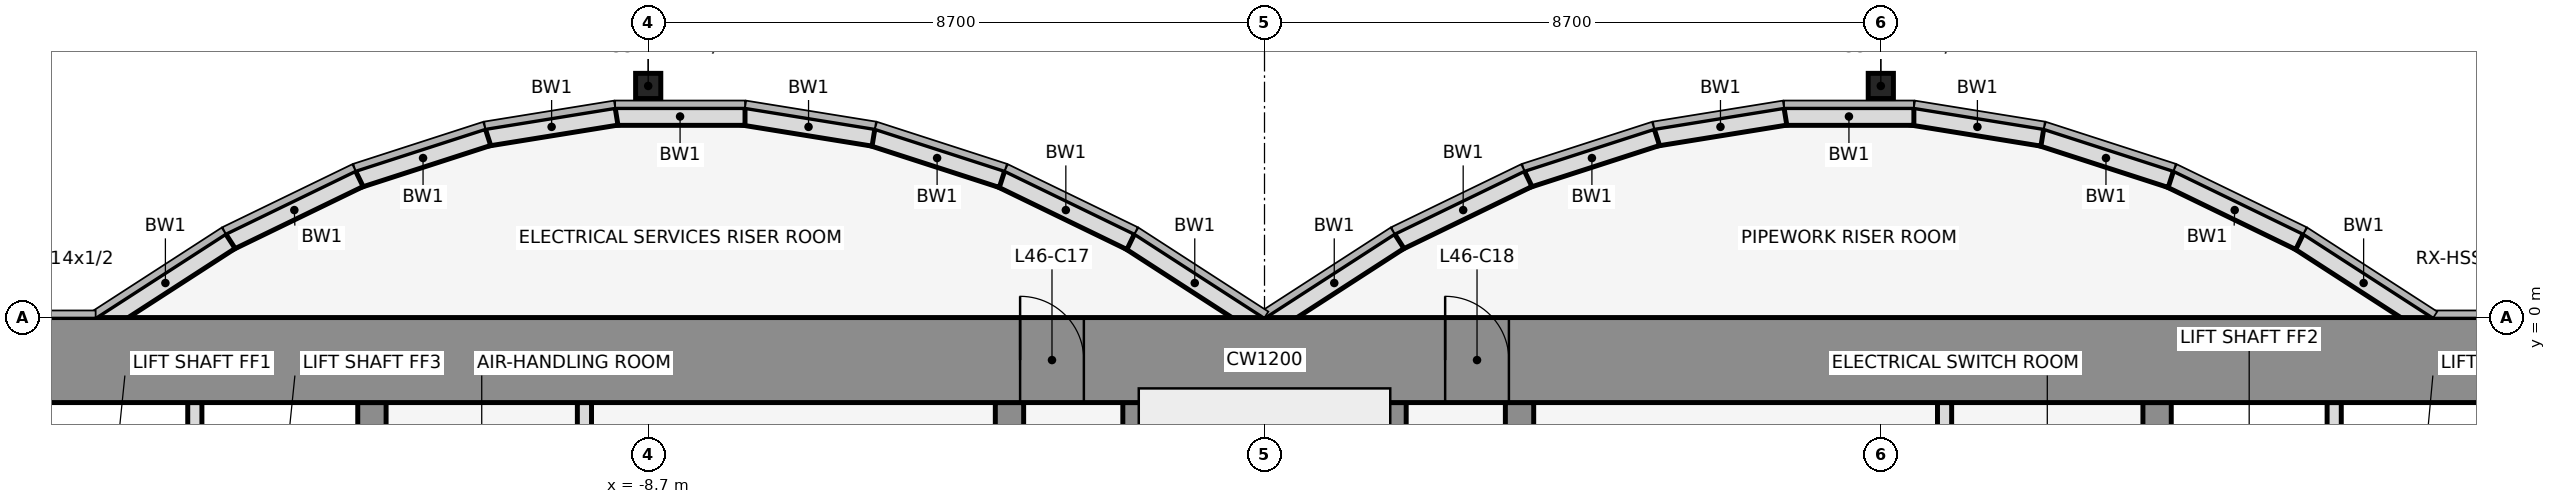
"""IFC4 building model, lengths in metres.
Left out: names, types, materials, properties, quantities, classifications, styles, units other than length and angle.
Written with IfcOpenShell. Run it as: python <this file> out.ifc"""

import sys

from ifc_helpers import new_model, si_unit, direction, frame, frame_2d, origin, origin_2d, place, context, subcontext, project, spatial, rectangle, hollow_rectangle, extrude, element, fill, save


model = new_model("IFC4")
c1 = context("Model", 3, precision=1e-05, world=origin(), true_north=direction((0.0, 1.0)))
c2 = subcontext(c1, "Body", "Model", "MODEL_VIEW")
j1 = project(units=[si_unit("LENGTHUNIT", "METRE"), si_unit("PLANEANGLEUNIT", "RADIAN")], contexts=[c1])
p1 = place(None, origin())
s1 = spatial("IfcSite", under=j1, at=p1, CompositionType="ELEMENT")
p2 = place(p1, origin())
s2 = spatial("IfcBuilding", under=s1, at=p2, CompositionType="ELEMENT")
p3 = place(p2, frame((0.0, 0.0, 207.3)))
s3 = spatial("IfcBuildingStorey", under=s2, at=p3, CompositionType="ELEMENT", Elevation=207.3)
for number, where, z_axis, x_axis in (
    (1, (-8.7, 3.269, 0.0), (0.0, 0.0, 1.0), (1.0, 0.0, 0.0)),
    (2, (8.7, 3.269, 0.0), (0.0, 0.0, 1.0), (1.0, 0.0, 0.0)),
):
    element("IfcColumn", number, at=place(p3, frame(where, z_axis=z_axis, x_axis=x_axis)), inside=s3, PredefinedType="COLUMN", context=c2, shape_type="SweptSolid", body=[
        extrude(hollow_rectangle(XDim=0.356, YDim=0.356, WallThickness=0.012, at=origin_2d()), origin(), (0.0, 0.0, 1.0), 4.1),
    ])
p4 = place(p3, frame((16.432, -0.105, 0.0), z_axis=(0.0, 0.0, 1.0), x_axis=(-0.83981312244, 0.542875602121, 0.0)))
e3 = element("IfcWall", 3, at=p4, inside=s3, PredefinedType="STANDARD", context=c2, shape_type="SweptSolid", body=[
    extrude(rectangle(XDim=2.183, YDim=0.25, at=frame_2d((1.091, 0.0))), origin(), (0.0, 0.0, 1.0), 3.95),
])
p5 = place(p3, frame((14.612, 1.073, 0.0), z_axis=(0.0, 0.0, 1.0), x_axis=(-0.89982408427, 0.436252928206, 0.0)))
e4 = element("IfcWall", 4, at=p5, inside=s3, PredefinedType="STANDARD", context=c2, shape_type="SweptSolid", body=[
    extrude(rectangle(XDim=2.038, YDim=0.25, at=frame_2d((1.019, 0.0))), origin(), (0.0, 0.0, 1.0), 3.95),
])
p6 = place(p3, frame((12.795, 1.955, 0.0), z_axis=(0.0, 0.0, 1.0), x_axis=(-0.951495806175, 0.307661714928, 0.0)))
e5 = element("IfcWall", 5, at=p6, inside=s3, PredefinedType="STANDARD", context=c2, shape_type="SweptSolid", body=[
    extrude(rectangle(XDim=1.927, YDim=0.25, at=frame_2d((0.963, 0.0))), origin(), (0.0, 0.0, 1.0), 3.95),
])
p7 = place(p3, frame((10.98, 2.543, 0.0), z_axis=(0.0, 0.0, 1.0), x_axis=(-0.987181718931, 0.159600293885, 0.0)))
e6 = element("IfcWall", 6, at=p7, inside=s3, PredefinedType="STANDARD", context=c2, shape_type="SweptSolid", body=[
    extrude(rectangle(XDim=1.857, YDim=0.25, at=frame_2d((0.929, 0.0))), origin(), (0.0, 0.0, 1.0), 3.95),
])
p8 = place(p3, frame((9.167, 2.838, 0.0), z_axis=(0.0, 0.0, 1.0), x_axis=(-1.0, 0.0, 0.0)))
e7 = element("IfcWall", 7, at=p8, inside=s3, PredefinedType="STANDARD", context=c2, shape_type="SweptSolid", body=[
    extrude(rectangle(XDim=1.833, YDim=0.25, at=frame_2d((0.917, 0.0))), origin(), (0.0, 0.0, 1.0), 3.95),
])
p9 = place(p3, frame((7.353, 2.84, 0.0), z_axis=(0.0, 0.0, 1.0), x_axis=(-0.987181718931, -0.159600293885, 0.0)))
e8 = element("IfcWall", 8, at=p9, inside=s3, PredefinedType="STANDARD", context=c2, shape_type="SweptSolid", body=[
    extrude(rectangle(XDim=1.857, YDim=0.25, at=frame_2d((0.929, 0.0))), origin(), (0.0, 0.0, 1.0), 3.95),
])
p10 = place(p3, frame((5.538, 2.548, 0.0), z_axis=(0.0, 0.0, 1.0), x_axis=(-0.951495806175, -0.307661714928, 0.0)))
e9 = element("IfcWall", 9, at=p10, inside=s3, PredefinedType="STANDARD", context=c2, shape_type="SweptSolid", body=[
    extrude(rectangle(XDim=1.927, YDim=0.25, at=frame_2d((0.963, 0.0))), origin(), (0.0, 0.0, 1.0), 3.95),
])
p11 = place(p3, frame((3.721, 1.962, 0.0), z_axis=(0.0, 0.0, 1.0), x_axis=(-0.89982408427, -0.436252928206, 0.0)))
e10 = element("IfcWall", 10, at=p11, inside=s3, PredefinedType="STANDARD", context=c2, shape_type="SweptSolid", body=[
    extrude(rectangle(XDim=2.038, YDim=0.25, at=frame_2d((1.019, 0.0))), origin(), (0.0, 0.0, 1.0), 3.95),
])
for number, where, z_axis, x_axis in (
    (11, (1.901, 1.08, 0.0), (0.0, 0.0, 1.0), (-0.84, -0.543, 0.0)),
    (12, (-0.068, -0.105, 0.0), (0.0, 0.0, 1.0), (-0.84, 0.543, 0.0)),
):
    element("IfcWall", number, at=place(p3, frame(where, z_axis=z_axis, x_axis=x_axis)), inside=s3, PredefinedType="STANDARD", context=c2, shape_type="SweptSolid", body=[
        extrude(rectangle(XDim=2.183, YDim=0.25, at=frame_2d((1.091, 0.0))), origin(), (0.0, 0.0, 1.0), 3.95),
    ])
p12 = place(p3, frame((-1.888, 1.073, 0.0), z_axis=(0.0, 0.0, 1.0), x_axis=(-0.89982408427, 0.436252928206, 0.0)))
e13 = element("IfcWall", 13, at=p12, inside=s3, PredefinedType="STANDARD", context=c2, shape_type="SweptSolid", body=[
    extrude(rectangle(XDim=2.038, YDim=0.25, at=frame_2d((1.019, 0.0))), origin(), (0.0, 0.0, 1.0), 3.95),
])
p13 = place(p3, frame((-3.705, 1.955, 0.0), z_axis=(0.0, 0.0, 1.0), x_axis=(-0.951495806175, 0.307661714928, 0.0)))
e14 = element("IfcWall", 14, at=p13, inside=s3, PredefinedType="STANDARD", context=c2, shape_type="SweptSolid", body=[
    extrude(rectangle(XDim=1.927, YDim=0.25, at=frame_2d((0.963, 0.0))), origin(), (0.0, 0.0, 1.0), 3.95),
])
p14 = place(p3, frame((-5.52, 2.543, 0.0), z_axis=(0.0, 0.0, 1.0), x_axis=(-0.987181718931, 0.159600293885, 0.0)))
e15 = element("IfcWall", 15, at=p14, inside=s3, PredefinedType="STANDARD", context=c2, shape_type="SweptSolid", body=[
    extrude(rectangle(XDim=1.857, YDim=0.25, at=frame_2d((0.929, 0.0))), origin(), (0.0, 0.0, 1.0), 3.95),
])
p15 = place(p3, frame((-7.333, 2.838, 0.0), z_axis=(0.0, 0.0, 1.0), x_axis=(-1.0, 0.0, 0.0)))
e16 = element("IfcWall", 16, at=p15, inside=s3, PredefinedType="STANDARD", context=c2, shape_type="SweptSolid", body=[
    extrude(rectangle(XDim=1.833, YDim=0.25, at=frame_2d((0.917, 0.0))), origin(), (0.0, 0.0, 1.0), 3.95),
])
p16 = place(p3, frame((-9.147, 2.84, 0.0), z_axis=(0.0, 0.0, 1.0), x_axis=(-0.987181718931, -0.159600293885, 0.0)))
e17 = element("IfcWall", 17, at=p16, inside=s3, PredefinedType="STANDARD", context=c2, shape_type="SweptSolid", body=[
    extrude(rectangle(XDim=1.857, YDim=0.25, at=frame_2d((0.929, 0.0))), origin(), (0.0, 0.0, 1.0), 3.95),
])
p17 = place(p3, frame((-10.962, 2.548, 0.0), z_axis=(0.0, 0.0, 1.0), x_axis=(-0.951495806175, -0.307661714928, 0.0)))
e18 = element("IfcWall", 18, at=p17, inside=s3, PredefinedType="STANDARD", context=c2, shape_type="SweptSolid", body=[
    extrude(rectangle(XDim=1.927, YDim=0.25, at=frame_2d((0.963, 0.0))), origin(), (0.0, 0.0, 1.0), 3.95),
])
p18 = place(p3, frame((-12.779, 1.962, 0.0), z_axis=(0.0, 0.0, 1.0), x_axis=(-0.89982408427, -0.436252928206, 0.0)))
e19 = element("IfcWall", 19, at=p18, inside=s3, PredefinedType="STANDARD", context=c2, shape_type="SweptSolid", body=[
    extrude(rectangle(XDim=2.038, YDim=0.25, at=frame_2d((1.019, 0.0))), origin(), (0.0, 0.0, 1.0), 3.95),
])
p19 = place(p3, frame((-14.599, 1.08, 0.0), z_axis=(0.0, 0.0, 1.0), x_axis=(-0.83981312244, -0.542875602121, 0.0)))
e20 = element("IfcWall", 20, at=p19, inside=s3, PredefinedType="STANDARD", context=c2, shape_type="SweptSolid", body=[
    extrude(rectangle(XDim=2.183, YDim=0.25, at=frame_2d((1.091, 0.0))), origin(), (0.0, 0.0, 1.0), 3.95),
])
p20 = place(p3, frame((-15.1, -4.6, 0.0), z_axis=(0.0, 0.0, 1.0), x_axis=(0.0, 1.0, 0.0)))
e21 = element("IfcWall", 21, at=p20, inside=s3, PredefinedType="PARTITIONING", context=c2, shape_type="SweptSolid", body=[
    extrude(rectangle(XDim=3.4, YDim=0.2, at=frame_2d((1.7, 0.0))), origin(), (0.0, 0.0, 1.0), 2.84),
])
p21 = place(p3, frame((-12.6, -11.8, 0.0), z_axis=(0.0, 0.0, 1.0), x_axis=(0.0, 1.0, 0.0)))
e22 = element("IfcWall", 22, at=p21, inside=s3, PredefinedType="SHEAR", context=c2, shape_type="SweptSolid", body=[
    extrude(rectangle(XDim=10.6, YDim=0.4, at=frame_2d((5.3, 0.0))), origin(), (0.0, 0.0, 1.0), 4.1),
])
p22 = place(p21, frame((4.75, 0.0, 0.0)))
e23 = element("IfcOpeningElement", 23, at=p22, cuts=e22, PredefinedType="OPENING", context=c2, shape_type="SweptSolid", body=[
    extrude(rectangle(XDim=1.1, YDim=2.1, at=frame_2d((0.55, 1.05))), frame((0.0, 0.212, 0.0), z_axis=(0.0, -1.0, 0.0), x_axis=(1.0, 0.0, 0.0)), (0.0, 0.0, 1.0), 0.424),
])
p23 = place(p3, frame((-9.6, -4.6, 0.0), z_axis=(0.0, 0.0, 1.0), x_axis=(0.0, 1.0, 0.0)))
e24 = element("IfcWall", 24, at=p23, inside=s3, PredefinedType="PARTITIONING", context=c2, shape_type="SweptSolid", body=[
    extrude(rectangle(XDim=3.4, YDim=0.2, at=frame_2d((1.7, 0.0))), origin(), (0.0, 0.0, 1.0), 2.84),
])
p24 = place(p3, frame((-3.6, -11.8, 0.0), z_axis=(0.0, 0.0, 1.0), x_axis=(0.0, 1.0, 0.0)))
e25 = element("IfcWall", 25, at=p24, inside=s3, PredefinedType="SHEAR", context=c2, shape_type="SweptSolid", body=[
    extrude(rectangle(XDim=10.6, YDim=0.4, at=frame_2d((5.3, 0.0))), origin(), (0.0, 0.0, 1.0), 4.1),
])
p25 = place(p24, frame((4.85, 0.0, 0.0)))
e26 = element("IfcOpeningElement", 26, at=p25, cuts=e25, PredefinedType="OPENING", context=c2, shape_type="SweptSolid", body=[
    extrude(rectangle(XDim=0.9, YDim=2.1, at=frame_2d((0.45, 1.05))), frame((0.0, 0.212, 0.0), z_axis=(0.0, -1.0, 0.0), x_axis=(1.0, 0.0, 0.0)), (0.0, 0.0, 1.0), 0.424),
])
for number, where, z_axis, x_axis in (
    (27, (-1.8, -11.8, 0.0), (0.0, 0.0, 1.0), (0.0, 1.0, 0.0)),
    (28, (1.8, -11.8, 0.0), (0.0, 0.0, 1.0), (0.0, 1.0, 0.0)),
):
    element("IfcWall", number, at=place(p3, frame(where, z_axis=z_axis, x_axis=x_axis)), inside=s3, PredefinedType="SHEAR", context=c2, shape_type="SweptSolid", body=[
        extrude(rectangle(XDim=10.6, YDim=0.4, at=frame_2d((5.3, 0.0))), origin(), (0.0, 0.0, 1.0), 4.1),
    ])
p26 = place(p3, frame((3.6, -11.8, 0.0), z_axis=(0.0, 0.0, 1.0), x_axis=(0.0, 1.0, 0.0)))
e29 = element("IfcWall", 29, at=p26, inside=s3, PredefinedType="SHEAR", context=c2, shape_type="SweptSolid", body=[
    extrude(rectangle(XDim=10.6, YDim=0.4, at=frame_2d((5.3, 0.0))), origin(), (0.0, 0.0, 1.0), 4.1),
])
p27 = place(p26, frame((1.35, 0.0, 0.0)))
e30 = element("IfcOpeningElement", 30, at=p27, cuts=e29, PredefinedType="OPENING", context=c2, shape_type="SweptSolid", body=[
    extrude(rectangle(XDim=0.9, YDim=2.1, at=frame_2d((0.45, 1.05))), frame((0.0, 0.212, 0.0), z_axis=(0.0, -1.0, 0.0), x_axis=(1.0, 0.0, 0.0)), (0.0, 0.0, 1.0), 0.424),
])
p28 = place(p3, frame((9.6, -4.6, 0.0), z_axis=(0.0, 0.0, 1.0), x_axis=(0.0, 1.0, 0.0)))
e31 = element("IfcWall", 31, at=p28, inside=s3, PredefinedType="PARTITIONING", context=c2, shape_type="SweptSolid", body=[
    extrude(rectangle(XDim=3.4, YDim=0.2, at=frame_2d((1.7, 0.0))), origin(), (0.0, 0.0, 1.0), 2.84),
])
p29 = place(p3, frame((12.6, -11.8, 0.0), z_axis=(0.0, 0.0, 1.0), x_axis=(0.0, 1.0, 0.0)))
e32 = element("IfcWall", 32, at=p29, inside=s3, PredefinedType="SHEAR", context=c2, shape_type="SweptSolid", body=[
    extrude(rectangle(XDim=10.6, YDim=0.4, at=frame_2d((5.3, 0.0))), origin(), (0.0, 0.0, 1.0), 4.1),
])
p30 = place(p29, frame((1.25, 0.0, 0.0)))
e33 = element("IfcOpeningElement", 33, at=p30, cuts=e32, PredefinedType="OPENING", context=c2, shape_type="SweptSolid", body=[
    extrude(rectangle(XDim=1.2, YDim=2.1, at=frame_2d((0.6, 1.05))), frame((0.0, 0.212, 0.0), z_axis=(0.0, -1.0, 0.0), x_axis=(1.0, 0.0, 0.0)), (0.0, 0.0, 1.0), 0.424),
])
p31 = place(p29, frame((4.75, 0.0, 0.0)))
e34 = element("IfcOpeningElement", 34, at=p31, cuts=e32, PredefinedType="OPENING", context=c2, shape_type="SweptSolid", body=[
    extrude(rectangle(XDim=1.1, YDim=2.1, at=frame_2d((0.55, 1.05))), frame((0.0, 0.212, 0.0), z_axis=(0.0, -1.0, 0.0), x_axis=(1.0, 0.0, 0.0)), (0.0, 0.0, 1.0), 0.424),
])
p32 = place(p3, frame((15.1, -4.6, 0.0), z_axis=(0.0, 0.0, 1.0), x_axis=(0.0, 1.0, 0.0)))
e35 = element("IfcWall", 35, at=p32, inside=s3, PredefinedType="PARTITIONING", context=c2, shape_type="SweptSolid", body=[
    extrude(rectangle(XDim=3.4, YDim=0.2, at=frame_2d((1.7, 0.0))), origin(), (0.0, 0.0, 1.0), 2.84),
])
p33 = place(p3, frame((-22.0, -0.6, 0.0), z_axis=(0.0, 0.0, 1.0), x_axis=(1.0, 0.0, 0.0)))
e36 = element("IfcWall", 36, at=p33, inside=s3, PredefinedType="SHEAR", context=c2, shape_type="SweptSolid", body=[
    extrude(rectangle(XDim=44.0, YDim=1.2, at=frame_2d((22.0, 0.0))), origin(), (0.0, 0.0, 1.0), 4.1),
])
p34 = place(p33, frame((18.55, 0.0, 0.0)))
e37 = element("IfcOpeningElement", 37, at=p34, cuts=e36, PredefinedType="OPENING", context=c2, shape_type="SweptSolid", body=[
    extrude(rectangle(XDim=0.9, YDim=2.1, at=frame_2d((0.45, 1.05))), frame((0.0, 0.612, 0.0), z_axis=(0.0, -1.0, 0.0), x_axis=(1.0, 0.0, 0.0)), (0.0, 0.0, 1.0), 1.224),
])
p35 = place(p33, frame((24.55, 0.0, 0.0)))
e38 = element("IfcOpeningElement", 38, at=p35, cuts=e36, PredefinedType="OPENING", context=c2, shape_type="SweptSolid", body=[
    extrude(rectangle(XDim=0.9, YDim=2.1, at=frame_2d((0.45, 1.05))), frame((0.0, 0.612, 0.0), z_axis=(0.0, -1.0, 0.0), x_axis=(1.0, 0.0, 0.0)), (0.0, 0.0, 1.0), 1.224),
])
p36 = place(p34, origin())
e39 = element("IfcDoor", 39, at=p36, inside=s3, OperationType="SINGLE_SWING_LEFT", PredefinedType="DOOR", context=c2, shape_type="SweptSolid", body=[
    extrude(rectangle(XDim=0.9, YDim=2.1, at=frame_2d((0.45, 1.05))), frame((0.0, 0.025, 0.0), z_axis=(0.0, -1.0, 0.0), x_axis=(1.0, 0.0, 0.0)), (0.0, 0.0, 1.0), 0.05),
])
fill(e37, e39)
p37 = place(p35, origin())
e40 = element("IfcDoor", 40, at=p37, inside=s3, OperationType="SINGLE_SWING_LEFT", PredefinedType="DOOR", context=c2, shape_type="SweptSolid", body=[
    extrude(rectangle(XDim=0.9, YDim=2.1, at=frame_2d((0.45, 1.05))), frame((0.0, 0.025, 0.0), z_axis=(0.0, -1.0, 0.0), x_axis=(1.0, 0.0, 0.0)), (0.0, 0.0, 1.0), 0.05),
])
fill(e38, e40)
save(model, sys.argv[1])
